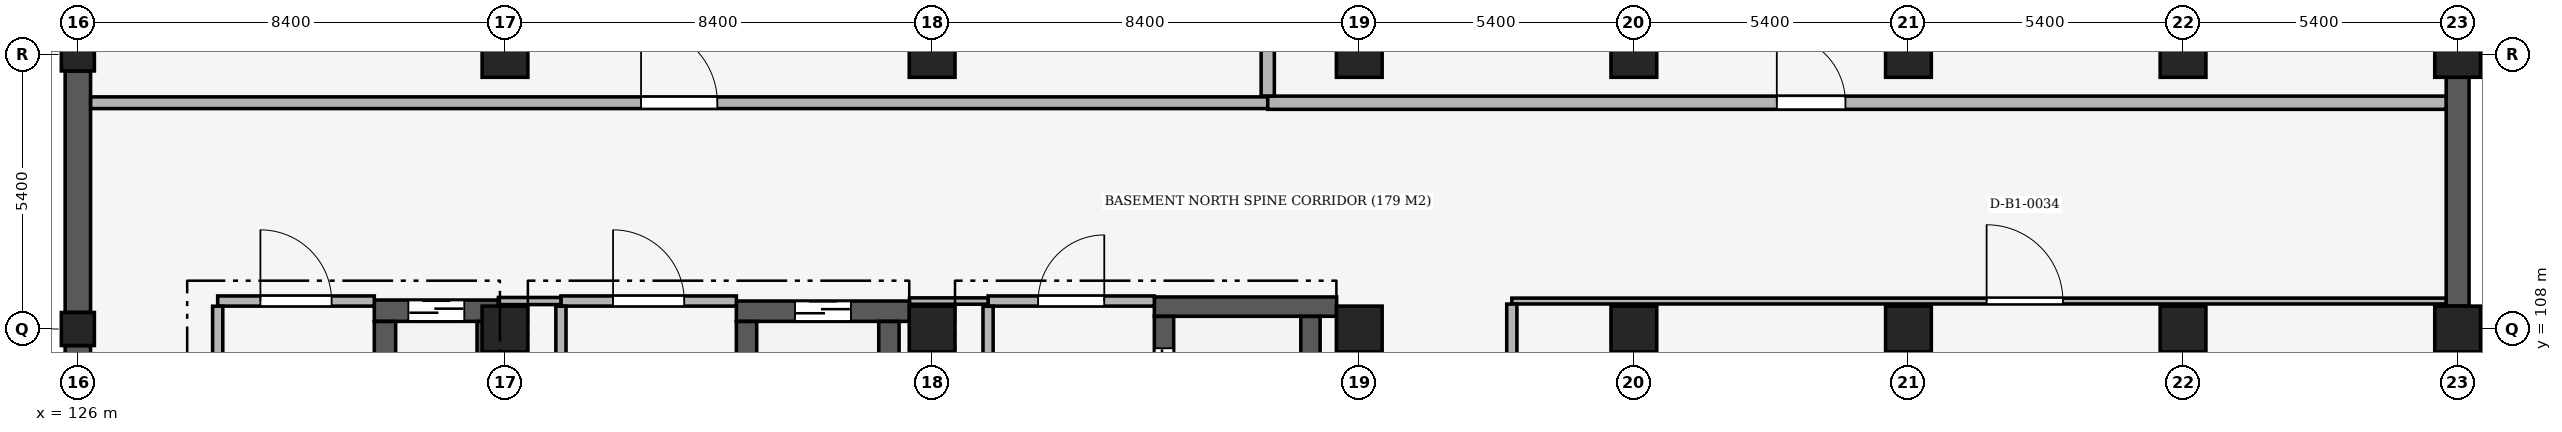
"""IFC4 building model, lengths in metres.
Left out: names, types, materials, properties, quantities, classifications, styles, units other than length and angle.
Written with IfcOpenShell. Run it as: python <this file> out.ifc"""

import sys

from ifc_helpers import new_model, si_unit, direction, frame, frame_2d, origin, origin_2d, place, context, subcontext, project, spatial, rectangle, extrude, element, fill, save


model = new_model("IFC4")
c1 = context("Model", 3, precision=1e-05, world=origin(), true_north=direction((0.0, 1.0)))
c2 = subcontext(c1, "Body", "Model", "MODEL_VIEW")
j1 = project(units=[si_unit("LENGTHUNIT", "METRE"), si_unit("PLANEANGLEUNIT", "RADIAN")], contexts=[c1])
p1 = place(None, origin())
s1 = spatial("IfcSite", under=j1, at=p1, CompositionType="ELEMENT")
p2 = place(p1, origin())
s2 = spatial("IfcBuilding", under=s1, at=p2, CompositionType="ELEMENT")
p3 = place(p2, frame((0.0, 0.0, -4.8)))
s3 = spatial("IfcBuildingStorey", under=s2, at=p3, CompositionType="ELEMENT", Elevation=-4.8)
for number, where, z_axis, x_axis in (
    (1, (126.0, 108.0, 0.0), (0.0, 0.0, 1.0), (1.0, 0.0, 0.0)),
    (2, (126.0, 113.4, 0.0), (0.0, 0.0, 1.0), (1.0, 0.0, 0.0)),
):
    element("IfcColumn", number, at=place(p3, frame(where, z_axis=z_axis, x_axis=x_axis)), inside=s3, PredefinedType="COLUMN", context=c2, shape_type="SweptSolid", body=[
        extrude(rectangle(XDim=0.65, YDim=0.65, at=origin_2d()), origin(), (0.0, 0.0, 1.0), 4.8),
    ])
for number, where, z_axis, x_axis in (
    (3, (134.4, 108.0, 0.0), (0.0, 0.0, 1.0), (1.0, 0.0, 0.0)),
    (4, (134.4, 113.4, 0.0), (0.0, 0.0, 1.0), (1.0, 0.0, 0.0)),
    (5, (142.8, 108.0, 0.0), (0.0, 0.0, 1.0), (1.0, 0.0, 0.0)),
    (6, (142.8, 113.4, 0.0), (0.0, 0.0, 1.0), (1.0, 0.0, 0.0)),
    (7, (151.2, 108.0, 0.0), (0.0, 0.0, 1.0), (1.0, 0.0, 0.0)),
    (8, (151.2, 113.4, 0.0), (0.0, 0.0, 1.0), (1.0, 0.0, 0.0)),
    (9, (156.6, 108.0, 0.0), (0.0, 0.0, 1.0), (1.0, 0.0, 0.0)),
    (10, (156.6, 113.4, 0.0), (0.0, 0.0, 1.0), (1.0, 0.0, 0.0)),
    (11, (162.0, 108.0, 0.0), (0.0, 0.0, 1.0), (1.0, 0.0, 0.0)),
    (12, (162.0, 113.4, 0.0), (0.0, 0.0, 1.0), (1.0, 0.0, 0.0)),
    (13, (167.4, 108.0, 0.0), (0.0, 0.0, 1.0), (1.0, 0.0, 0.0)),
    (14, (167.4, 113.4, 0.0), (0.0, 0.0, 1.0), (1.0, 0.0, 0.0)),
    (15, (172.8, 108.0, 0.0), (0.0, 0.0, 1.0), (1.0, 0.0, 0.0)),
    (16, (172.8, 113.4, 0.0), (0.0, 0.0, 1.0), (1.0, 0.0, 0.0)),
):
    element("IfcColumn", number, at=place(p3, frame(where, z_axis=z_axis, x_axis=x_axis)), inside=s3, PredefinedType="COLUMN", context=c2, shape_type="SweptSolid", body=[
        extrude(rectangle(XDim=0.9, YDim=0.9, at=origin_2d()), origin(), (0.0, 0.0, 1.0), 4.8),
    ])
p4 = place(p3, frame((126.0, 99.925, 0.0), z_axis=(0.0, 0.0, 1.0), x_axis=(0.0, 1.0, 0.0)))
e17 = element("IfcWall", 17, at=p4, inside=s3, PredefinedType="USERDEFINED", context=c2, shape_type="SweptSolid", body=[
    extrude(rectangle(XDim=7.75, YDim=0.5, at=frame_2d((3.875, 0.0))), origin(), (0.0, 0.0, 1.0), 3.7),
])
p5 = place(p3, frame((126.0, 108.325, 0.0), z_axis=(0.0, 0.0, 1.0), x_axis=(0.0, 1.0, 0.0)))
e18 = element("IfcWall", 18, at=p5, inside=s3, PredefinedType="USERDEFINED", context=c2, shape_type="SweptSolid", body=[
    extrude(rectangle(XDim=4.75, YDim=0.5, at=frame_2d((2.375, 0.0))), origin(), (0.0, 0.0, 1.0), 3.85),
])
p6 = place(p3, frame((172.8, 112.95, 0.0), z_axis=(0.0, 0.0, 1.0), x_axis=(0.0, -1.0, 0.0)))
e19 = element("IfcWall", 19, at=p6, inside=s3, PredefinedType="USERDEFINED", context=c2, shape_type="SweptSolid", body=[
    extrude(rectangle(XDim=4.5, YDim=0.45, at=frame_2d((2.25, 0.0))), origin(), (0.0, 0.0, 1.0), 3.85),
])
p7 = place(p3, frame((131.83, 108.36, 0.0), z_axis=(0.0, 0.0, 1.0), x_axis=(1.0, 0.0, 0.0)))
e20 = element("IfcWall", 20, at=p7, inside=s3, PredefinedType="SHEAR", context=c2, shape_type="SweptSolid", body=[
    extrude(rectangle(XDim=2.44, YDim=0.42, at=frame_2d((1.22, 0.0))), origin(), (0.0, 0.0, 1.0), 4.5),
])
p8 = place(p7, frame((0.67, 0.0, 0.0)))
e21 = element("IfcOpeningElement", 21, at=p8, cuts=e20, PredefinedType="OPENING", context=c2, shape_type="SweptSolid", body=[
    extrude(rectangle(XDim=1.1, YDim=2.15, at=frame_2d((0.55, 1.075))), frame((0.0, 0.225, 0.0), z_axis=(0.0, -1.0, 0.0), x_axis=(1.0, 0.0, 0.0)), (0.0, 0.0, 1.0), 0.45),
])
for number, where, z_axis, x_axis in (
    (22, (132.04, 106.093, 0.0), (0.0, 0.0, 1.0), (0.0, 1.0, 0.0)),
    (23, (134.06, 106.093, 0.0), (0.0, 0.0, 1.0), (0.0, 1.0, 0.0)),
):
    element("IfcWall", number, at=place(p3, frame(where, z_axis=z_axis, x_axis=x_axis)), inside=s3, PredefinedType="SHEAR", context=c2, shape_type="SweptSolid", body=[
        extrude(rectangle(XDim=2.055, YDim=0.42, at=frame_2d((1.027, 0.0))), origin(), (0.0, 0.0, 1.0), 4.5),
    ])
p9 = place(p3, frame((138.95, 108.35, 0.0), z_axis=(0.0, 0.0, 1.0), x_axis=(1.0, 0.0, 0.0)))
e24 = element("IfcWall", 24, at=p9, inside=s3, PredefinedType="SHEAR", context=c2, shape_type="SweptSolid", body=[
    extrude(rectangle(XDim=3.405, YDim=0.4, at=frame_2d((1.703, 0.0))), origin(), (0.0, 0.0, 1.0), 4.5),
])
p10 = place(p9, frame((1.153, 0.0, 0.0)))
e25 = element("IfcOpeningElement", 25, at=p10, cuts=e24, PredefinedType="OPENING", context=c2, shape_type="SweptSolid", body=[
    extrude(rectangle(XDim=1.1, YDim=2.15, at=frame_2d((0.55, 1.075))), frame((0.0, 0.215, 0.0), z_axis=(0.0, -1.0, 0.0), x_axis=(1.0, 0.0, 0.0)), (0.0, 0.0, 1.0), 0.43),
])
for number, where, z_axis, x_axis in (
    (26, (139.15, 106.093, 0.0), (0.0, 0.0, 1.0), (0.0, 1.0, 0.0)),
    (27, (141.95, 106.093, 0.0), (0.0, 0.0, 1.0), (0.0, 1.0, 0.0)),
):
    element("IfcWall", number, at=place(p3, frame(where, z_axis=z_axis, x_axis=x_axis)), inside=s3, PredefinedType="SHEAR", context=c2, shape_type="SweptSolid", body=[
        extrude(rectangle(XDim=2.055, YDim=0.4, at=frame_2d((1.027, 0.0))), origin(), (0.0, 0.0, 1.0), 4.5),
    ])
p11 = place(p3, frame((147.17, 108.44, 0.0), z_axis=(0.0, 0.0, 1.0), x_axis=(1.0, 0.0, 0.0)))
e28 = element("IfcWall", 28, at=p11, inside=s3, PredefinedType="SHEAR", context=c2, shape_type="SweptSolid", body=[
    extrude(rectangle(XDim=3.585, YDim=0.38, at=frame_2d((1.792, 0.0))), origin(), (0.0, 0.0, 1.0), 4.5),
])
p12 = place(p3, frame((147.36, 105.793, 0.0), z_axis=(0.0, 0.0, 1.0), x_axis=(0.0, 1.0, 0.0)))
e29 = element("IfcWall", 29, at=p12, inside=s3, PredefinedType="SHEAR", context=c2, shape_type="SweptSolid", body=[
    extrude(rectangle(XDim=2.455, YDim=0.38, at=frame_2d((1.228, 0.0))), origin(), (0.0, 0.0, 1.0), 4.5),
])
p13 = place(p12, frame((0.627, 0.0, 0.0)))
e30 = element("IfcOpeningElement", 30, at=p13, cuts=e29, PredefinedType="OPENING", context=c2, shape_type="SweptSolid", body=[
    extrude(rectangle(XDim=1.2, YDim=2.15, at=frame_2d((0.6, 1.075))), frame((0.0, 0.205, 0.0), z_axis=(0.0, -1.0, 0.0), x_axis=(1.0, 0.0, 0.0)), (0.0, 0.0, 1.0), 0.41),
])
p14 = place(p3, frame((150.24, 105.793, 0.0), z_axis=(0.0, 0.0, 1.0), x_axis=(0.0, 1.0, 0.0)))
e31 = element("IfcWall", 31, at=p14, inside=s3, PredefinedType="SHEAR", context=c2, shape_type="SweptSolid", body=[
    extrude(rectangle(XDim=2.455, YDim=0.38, at=frame_2d((1.228, 0.0))), origin(), (0.0, 0.0, 1.0), 4.5),
])
p15 = place(p3, frame((128.75, 108.55, 0.0), z_axis=(0.0, 0.0, 1.0), x_axis=(1.0, 0.0, 0.0)))
e32 = element("IfcWall", 32, at=p15, inside=s3, PredefinedType="PARTITIONING", context=c2, shape_type="SweptSolid", body=[
    extrude(rectangle(XDim=3.08, YDim=0.2, at=frame_2d((1.54, 0.0))), origin(), (0.0, 0.0, 1.0), 4.5),
])
p16 = place(p15, frame((0.84, 0.0, 0.0)))
e33 = element("IfcOpeningElement", 33, at=p16, cuts=e32, PredefinedType="OPENING", context=c2, shape_type="SweptSolid", body=[
    extrude(rectangle(XDim=1.4, YDim=2.2, at=frame_2d((0.7, 1.1))), frame((0.0, 0.115, 0.0), z_axis=(0.0, -1.0, 0.0), x_axis=(1.0, 0.0, 0.0)), (0.0, 0.0, 1.0), 0.23),
])
p17 = place(p3, frame((135.5, 108.55, 0.0), z_axis=(0.0, 0.0, 1.0), x_axis=(1.0, 0.0, 0.0)))
e34 = element("IfcWall", 34, at=p17, inside=s3, PredefinedType="PARTITIONING", context=c2, shape_type="SweptSolid", body=[
    extrude(rectangle(XDim=3.45, YDim=0.2, at=frame_2d((1.725, 0.0))), origin(), (0.0, 0.0, 1.0), 4.5),
])
p18 = place(p17, frame((1.025, 0.0, 0.0)))
e35 = element("IfcOpeningElement", 35, at=p18, cuts=e34, PredefinedType="OPENING", context=c2, shape_type="SweptSolid", body=[
    extrude(rectangle(XDim=1.4, YDim=2.2, at=frame_2d((0.7, 1.1))), frame((0.0, 0.115, 0.0), z_axis=(0.0, -1.0, 0.0), x_axis=(1.0, 0.0, 0.0)), (0.0, 0.0, 1.0), 0.23),
])
p19 = place(p3, frame((143.9, 108.55, 0.0), z_axis=(0.0, 0.0, 1.0), x_axis=(1.0, 0.0, 0.0)))
e36 = element("IfcWall", 36, at=p19, inside=s3, PredefinedType="PARTITIONING", context=c2, shape_type="SweptSolid", body=[
    extrude(rectangle(XDim=3.27, YDim=0.2, at=frame_2d((1.635, 0.0))), origin(), (0.0, 0.0, 1.0), 4.5),
])
p20 = place(p19, frame((0.985, 0.0, 0.0)))
e37 = element("IfcOpeningElement", 37, at=p20, cuts=e36, PredefinedType="OPENING", context=c2, shape_type="SweptSolid", body=[
    extrude(rectangle(XDim=1.3, YDim=2.2, at=frame_2d((0.65, 1.1))), frame((0.0, 0.115, 0.0), z_axis=(0.0, -1.0, 0.0), x_axis=(1.0, 0.0, 0.0)), (0.0, 0.0, 1.0), 0.23),
])
p21 = place(p3, frame((134.27, 108.55, 0.0), z_axis=(0.0, 0.0, 1.0), x_axis=(1.0, 0.0, 0.0)))
e38 = element("IfcWall", 38, at=p21, inside=s3, PredefinedType="PARTITIONING", context=c2, shape_type="SweptSolid", body=[
    extrude(rectangle(XDim=1.23, YDim=0.14, at=frame_2d((0.615, 0.0))), origin(), (0.0, 0.0, 1.0), 3.85),
])
p22 = place(p3, frame((142.355, 108.55, 0.0), z_axis=(0.0, 0.0, 1.0), x_axis=(1.0, 0.0, 0.0)))
e39 = element("IfcWall", 39, at=p22, inside=s3, PredefinedType="PARTITIONING", context=c2, shape_type="SweptSolid", body=[
    extrude(rectangle(XDim=1.545, YDim=0.125, at=frame_2d((0.772, 0.0))), origin(), (0.0, 0.0, 1.0), 3.85),
])
p23 = place(p3, frame((154.2, 108.55, 0.0), z_axis=(0.0, 0.0, 1.0), x_axis=(1.0, 0.0, 0.0)))
e40 = element("IfcWall", 40, at=p23, inside=s3, PredefinedType="PARTITIONING", context=c2, shape_type="SweptSolid", body=[
    extrude(rectangle(XDim=18.373, YDim=0.115, at=frame_2d((9.187, 0.0))), origin(), (0.0, 0.0, 1.0), 3.85),
])
p24 = place(p23, frame((9.337, 0.0, 0.0)))
e41 = element("IfcOpeningElement", 41, at=p24, cuts=e40, PredefinedType="OPENING", context=c2, shape_type="SweptSolid", body=[
    extrude(rectangle(XDim=1.5, YDim=2.2, at=frame_2d((0.75, 1.1))), frame((0.0, 0.072, 0.0), z_axis=(0.0, -1.0, 0.0), x_axis=(1.0, 0.0, 0.0)), (0.0, 0.0, 1.0), 0.145),
])
p25 = place(p3, frame((126.252, 112.45, 0.0), z_axis=(0.0, 0.0, 1.0), x_axis=(1.0, 0.0, 0.0)))
e42 = element("IfcWall", 42, at=p25, inside=s3, PredefinedType="SOLIDWALL", context=c2, shape_type="SweptSolid", body=[
    extrude(rectangle(XDim=23.148, YDim=0.23, at=frame_2d((11.574, 0.0))), origin(), (0.0, 0.0, 1.0), 3.85),
])
p26 = place(p25, frame((10.824, 0.0, 0.0)))
e43 = element("IfcOpeningElement", 43, at=p26, cuts=e42, PredefinedType="OPENING", context=c2, shape_type="SweptSolid", body=[
    extrude(rectangle(XDim=1.5, YDim=2.2, at=frame_2d((0.75, 1.1))), frame((0.0, 0.13, 0.0), z_axis=(0.0, -1.0, 0.0), x_axis=(1.0, 0.0, 0.0)), (0.0, 0.0, 1.0), 0.26),
])
p27 = place(p3, frame((149.4, 112.45, 0.0), z_axis=(0.0, 0.0, 1.0), x_axis=(1.0, 0.0, 0.0)))
e44 = element("IfcWall", 44, at=p27, inside=s3, PredefinedType="PARTITIONING", context=c2, shape_type="SweptSolid", body=[
    extrude(rectangle(XDim=23.173, YDim=0.26, at=frame_2d((11.586, 0.0))), origin(), (0.0, 0.0, 1.0), 3.85),
])
p28 = place(p27, frame((10.011, 0.0, 0.0)))
e45 = element("IfcOpeningElement", 45, at=p28, cuts=e44, PredefinedType="OPENING", context=c2, shape_type="SweptSolid", body=[
    extrude(rectangle(XDim=1.35, YDim=2.2, at=frame_2d((0.675, 1.1))), frame((0.0, 0.145, 0.0), z_axis=(0.0, -1.0, 0.0), x_axis=(1.0, 0.0, 0.0)), (0.0, 0.0, 1.0), 0.29),
])
p29 = place(p3, frame((128.75, 103.672, 0.0), z_axis=(0.0, 0.0, 1.0), x_axis=(0.0, 1.0, 0.0)))
e46 = element("IfcWall", 46, at=p29, inside=s3, PredefinedType="PARTITIONING", context=c2, shape_type="SweptSolid", body=[
    extrude(rectangle(XDim=4.776, YDim=0.2, at=frame_2d((2.388, 0.0))), origin(), (0.0, 0.0, 1.0), 4.5),
])
p30 = place(p3, frame((135.5, 103.652, 0.0), z_axis=(0.0, 0.0, 1.0), x_axis=(0.0, 1.0, 0.0)))
e47 = element("IfcWall", 47, at=p30, inside=s3, PredefinedType="PARTITIONING", context=c2, shape_type="SweptSolid", body=[
    extrude(rectangle(XDim=4.796, YDim=0.2, at=frame_2d((2.398, 0.0))), origin(), (0.0, 0.0, 1.0), 4.5),
])
p31 = place(p3, frame((143.9, 103.632, 0.0), z_axis=(0.0, 0.0, 1.0), x_axis=(0.0, 1.0, 0.0)))
e48 = element("IfcWall", 48, at=p31, inside=s3, PredefinedType="PARTITIONING", context=c2, shape_type="SweptSolid", body=[
    extrude(rectangle(XDim=4.816, YDim=0.2, at=frame_2d((2.408, 0.0))), origin(), (0.0, 0.0, 1.0), 4.5),
])
p32 = place(p3, frame((149.4, 112.582, 0.0), z_axis=(0.0, 0.0, 1.0), x_axis=(0.0, 1.0, 0.0)))
e49 = element("IfcWall", 49, at=p32, inside=s3, PredefinedType="PARTITIONING", context=c2, shape_type="SweptSolid", body=[
    extrude(rectangle(XDim=5.966, YDim=0.26, at=frame_2d((2.983, 0.0))), origin(), (0.0, 0.0, 1.0), 3.8),
])
p33 = place(p3, frame((154.2, 93.852, 0.0), z_axis=(0.0, 0.0, 1.0), x_axis=(0.0, 1.0, 0.0)))
e50 = element("IfcWall", 50, at=p33, inside=s3, PredefinedType="PARTITIONING", context=c2, shape_type="SweptSolid", body=[
    extrude(rectangle(XDim=14.638, YDim=0.2, at=frame_2d((7.319, 0.0))), origin(), (0.0, 0.0, 1.0), 3.9),
])
p34 = place(p8, origin())
e51 = element("IfcDoor", 51, at=p34, inside=s3, OperationType="DOUBLE_DOOR_SLIDING", PredefinedType="DOOR", context=c2, shape_type="SweptSolid", body=[
    extrude(rectangle(XDim=1.1, YDim=2.15, at=frame_2d((0.55, 1.075))), frame((0.0, 0.025, 0.0), z_axis=(0.0, -1.0, 0.0), x_axis=(1.0, 0.0, 0.0)), (0.0, 0.0, 1.0), 0.05),
])
fill(e21, e51)
p35 = place(p10, origin())
e52 = element("IfcDoor", 52, at=p35, inside=s3, OperationType="DOUBLE_DOOR_SLIDING", PredefinedType="DOOR", context=c2, shape_type="SweptSolid", body=[
    extrude(rectangle(XDim=1.1, YDim=2.15, at=frame_2d((0.55, 1.075))), frame((0.0, 0.025, 0.0), z_axis=(0.0, -1.0, 0.0), x_axis=(1.0, 0.0, 0.0)), (0.0, 0.0, 1.0), 0.05),
])
fill(e25, e52)
p36 = place(p13, origin())
e53 = element("IfcDoor", 53, at=p36, inside=s3, OperationType="DOUBLE_DOOR_SLIDING", PredefinedType="DOOR", context=c2, shape_type="SweptSolid", body=[
    extrude(rectangle(XDim=1.2, YDim=2.15, at=frame_2d((0.6, 1.075))), frame((0.0, 0.025, 0.0), z_axis=(0.0, -1.0, 0.0), x_axis=(1.0, 0.0, 0.0)), (0.0, 0.0, 1.0), 0.05),
])
fill(e30, e53)
p37 = place(p16, origin())
e54 = element("IfcDoor", 54, at=p37, inside=s3, OperationType="SINGLE_SWING_LEFT", PredefinedType="DOOR", context=c2, shape_type="SweptSolid", body=[
    extrude(rectangle(XDim=1.4, YDim=2.2, at=frame_2d((0.7, 1.1))), frame((0.0, 0.025, 0.0), z_axis=(0.0, -1.0, 0.0), x_axis=(1.0, 0.0, 0.0)), (0.0, 0.0, 1.0), 0.05),
])
fill(e33, e54)
p38 = place(p18, origin())
e55 = element("IfcDoor", 55, at=p38, inside=s3, OperationType="SINGLE_SWING_LEFT", PredefinedType="DOOR", context=c2, shape_type="SweptSolid", body=[
    extrude(rectangle(XDim=1.4, YDim=2.2, at=frame_2d((0.7, 1.1))), frame((0.0, 0.025, 0.0), z_axis=(0.0, -1.0, 0.0), x_axis=(1.0, 0.0, 0.0)), (0.0, 0.0, 1.0), 0.05),
])
fill(e35, e55)
p39 = place(p20, origin())
e56 = element("IfcDoor", 56, at=p39, inside=s3, OperationType="SINGLE_SWING_RIGHT", PredefinedType="DOOR", context=c2, shape_type="SweptSolid", body=[
    extrude(rectangle(XDim=1.3, YDim=2.2, at=frame_2d((0.65, 1.1))), frame((0.0, 0.025, 0.0), z_axis=(0.0, -1.0, 0.0), x_axis=(1.0, 0.0, 0.0)), (0.0, 0.0, 1.0), 0.05),
])
fill(e37, e56)
p40 = place(p26, origin())
e57 = element("IfcDoor", 57, at=p40, inside=s3, OperationType="SINGLE_SWING_LEFT", PredefinedType="DOOR", context=c2, shape_type="SweptSolid", body=[
    extrude(rectangle(XDim=1.5, YDim=2.2, at=frame_2d((0.75, 1.1))), frame((0.0, 0.025, 0.0), z_axis=(0.0, -1.0, 0.0), x_axis=(1.0, 0.0, 0.0)), (0.0, 0.0, 1.0), 0.05),
])
fill(e43, e57)
p41 = place(p28, origin())
e58 = element("IfcDoor", 58, at=p41, inside=s3, OperationType="SINGLE_SWING_LEFT", PredefinedType="DOOR", context=c2, shape_type="SweptSolid", body=[
    extrude(rectangle(XDim=1.35, YDim=2.2, at=frame_2d((0.675, 1.1))), frame((0.0, 0.025, 0.0), z_axis=(0.0, -1.0, 0.0), x_axis=(1.0, 0.0, 0.0)), (0.0, 0.0, 1.0), 0.05),
])
fill(e45, e58)
p42 = place(p24, origin())
e59 = element("IfcDoor", 59, at=p42, inside=s3, OperationType="SINGLE_SWING_LEFT", PredefinedType="DOOR", context=c2, shape_type="SweptSolid", body=[
    extrude(rectangle(XDim=1.5, YDim=2.2, at=frame_2d((0.75, 1.1))), frame((0.0, 0.025, 0.0), z_axis=(0.0, -1.0, 0.0), x_axis=(1.0, 0.0, 0.0)), (0.0, 0.0, 1.0), 0.05),
])
fill(e41, e59)
save(model, sys.argv[1])
